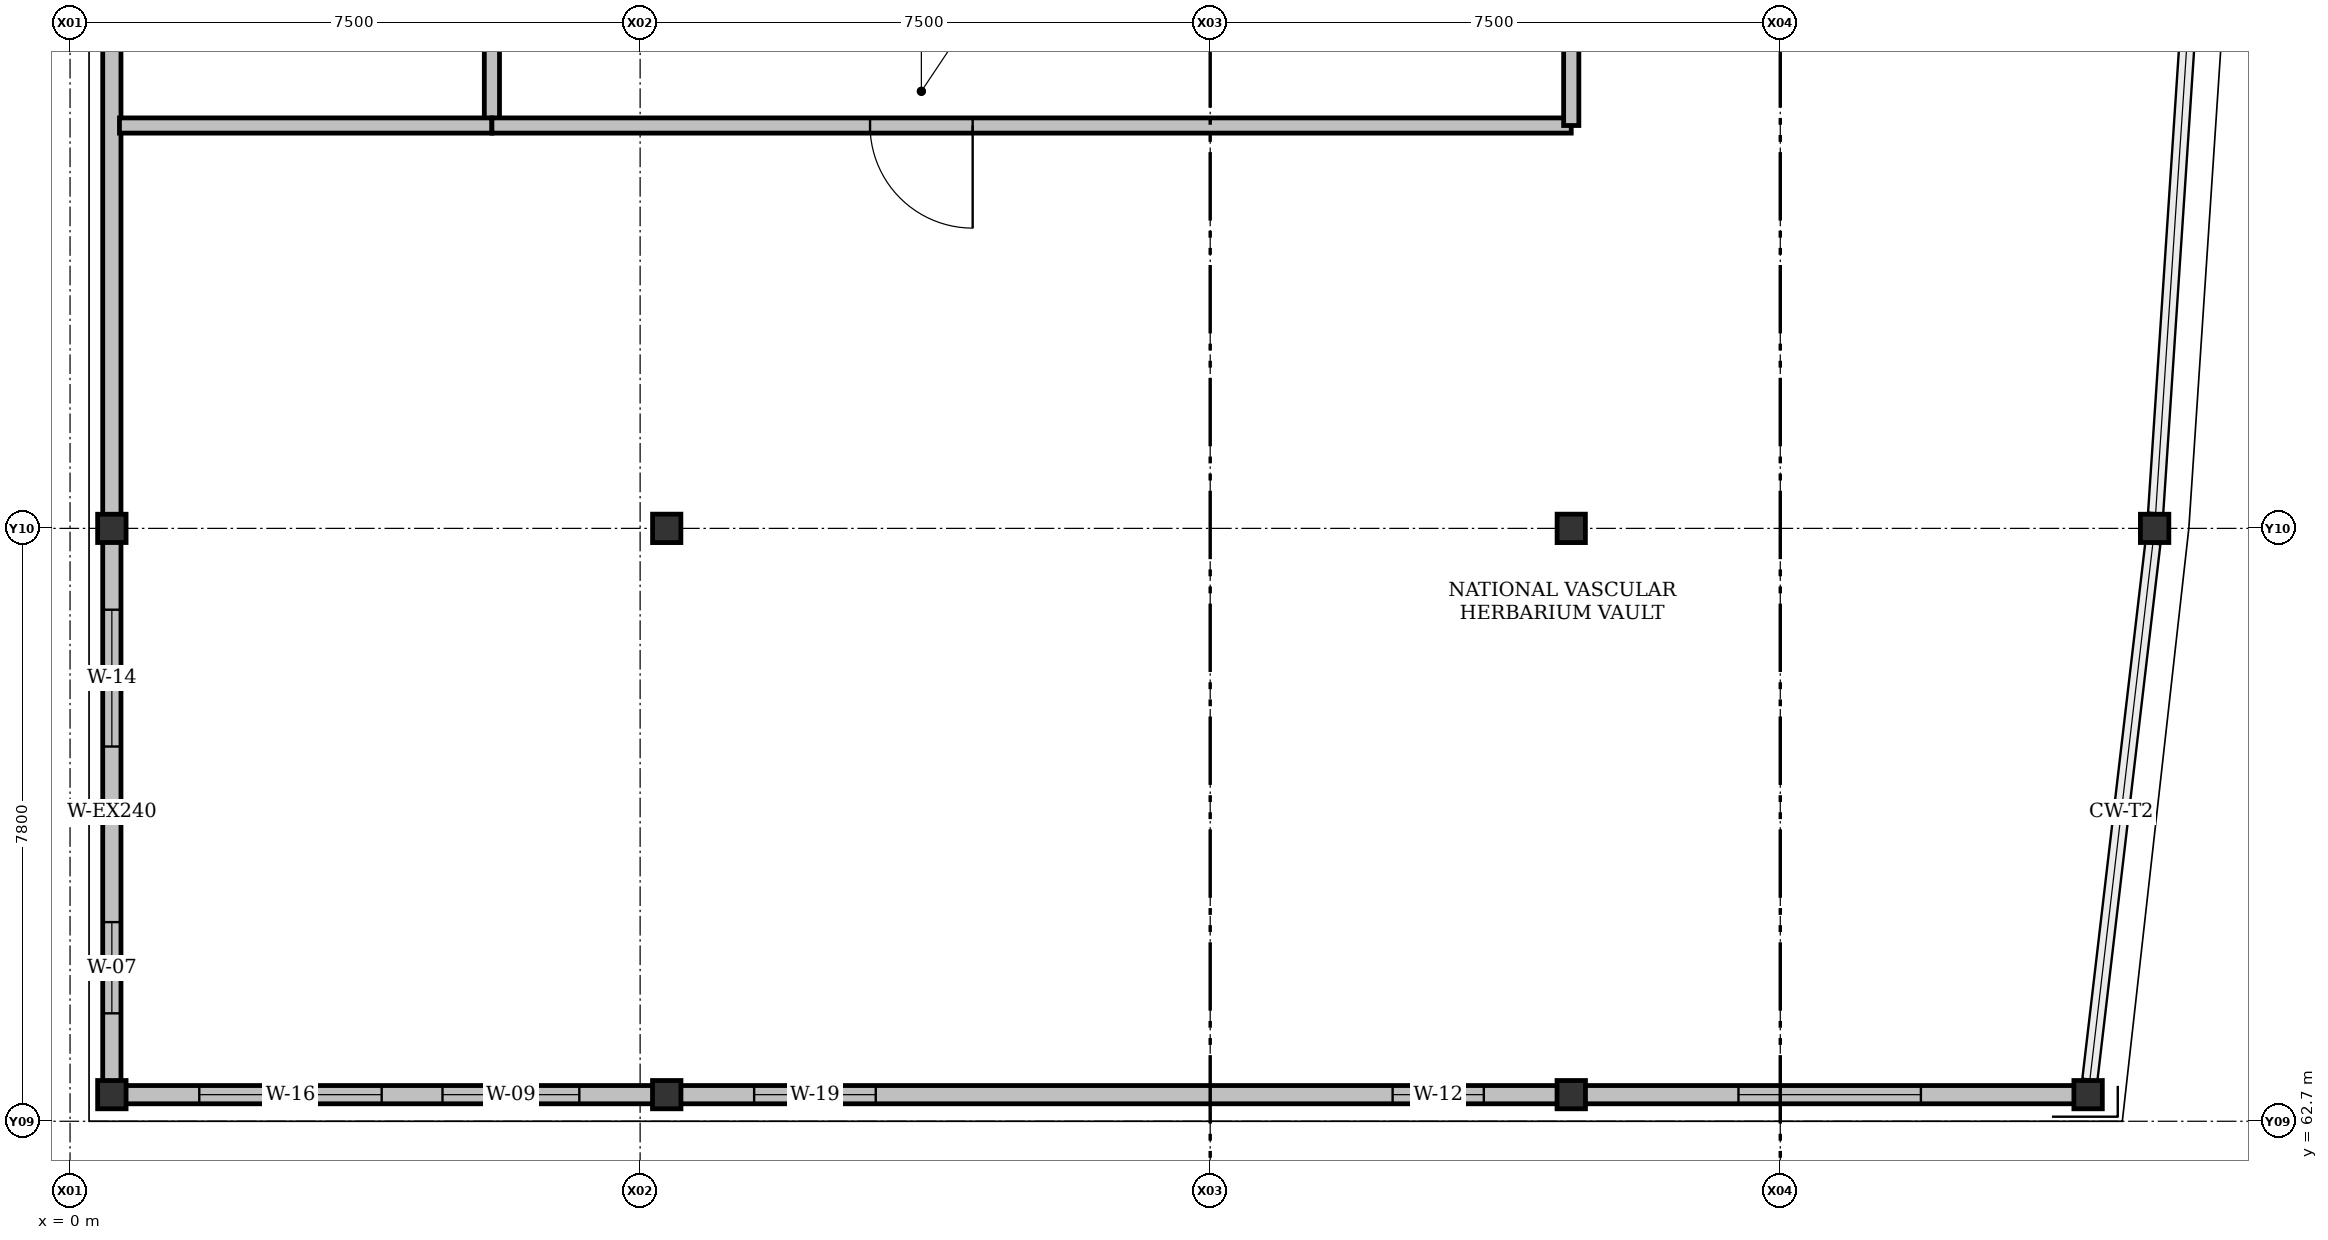
"""IFC4 building model, lengths in metres.
Left out: names, types, materials, properties, quantities, classifications, styles, units other than length and angle.
Written with IfcOpenShell. Run it as: python <this file> out.ifc"""

import sys

from ifc_helpers import new_model, si_unit, direction, frame, frame_2d, origin, origin_2d, place, context, subcontext, project, spatial, rectangle, i_section, extrude, element, fill, save


model = new_model("IFC4")
c1 = context("Model", 3, precision=1e-05, world=origin(), true_north=direction((0.0, 1.0)))
c2 = subcontext(c1, "Body", "Model", "MODEL_VIEW")
j1 = project(units=[si_unit("LENGTHUNIT", "METRE"), si_unit("PLANEANGLEUNIT", "RADIAN")], contexts=[c1])
p1 = place(None, origin())
s1 = spatial("IfcSite", under=j1, at=p1, CompositionType="ELEMENT")
p2 = place(p1, origin())
s2 = spatial("IfcBuilding", under=s1, at=p2, CompositionType="ELEMENT")
p3 = place(p2, frame((0.0, 0.0, 26.7)))
s3 = spatial("IfcBuildingStorey", under=s2, at=p3, CompositionType="ELEMENT", Elevation=26.7)
for number, where, z_axis, x_axis in (
    (1, (0.55, 63.05, 0.0), (0.0, 0.0, 1.0), (1.0, 0.0, 0.0)),
    (2, (7.85, 63.05, 0.0), (0.0, 0.0, 1.0), (1.0, 0.0, 0.0)),
    (3, (19.75, 63.05, 0.0), (0.0, 0.0, 1.0), (1.0, 0.0, 0.0)),
    (4, (26.55, 63.05, 0.0), (0.0, 0.0, 1.0), (1.0, 0.0, 0.0)),
    (5, (0.55, 70.5, 0.0), (0.0, 0.0, 1.0), (1.0, 0.0, 0.0)),
    (6, (7.85, 70.5, 0.0), (0.0, 0.0, 1.0), (0.0, 1.0, 0.0)),
    (7, (19.75, 70.5, 0.0), (0.0, 0.0, 1.0), (0.0, 1.0, 0.0)),
    (8, (27.425, 70.5, 0.0), (0.0, 0.0, 1.0), (1.0, 0.0, 0.0)),
):
    element("IfcColumn", number, at=place(p3, frame(where, z_axis=z_axis, x_axis=x_axis)), inside=s3, PredefinedType="COLUMN", context=c2, shape_type="SweptSolid", body=[
        extrude(i_section(OverallWidth=0.374, OverallDepth=0.372, WebThickness=0.016, FlangeThickness=0.026, FilletRadius=0.015, at=origin_2d()), origin(), (0.0, 0.0, 1.0), 4.2),
    ])
p4 = place(p3, frame((0.55, 63.05, 0.0), z_axis=(0.0, 0.0, 1.0), x_axis=(0.0, 1.0, 0.0)))
e9 = element("IfcWall", 9, at=p4, inside=s3, PredefinedType="SOLIDWALL", context=c2, shape_type="SweptSolid", body=[
    extrude(rectangle(XDim=7.45, YDim=0.24, at=frame_2d((3.725, 0.0))), origin(), (0.0, 0.0, 1.0), 3.557),
])
p5 = place(p4, frame((1.07, 0.0, 0.92)))
e10 = element("IfcOpeningElement", 10, at=p5, cuts=e9, PredefinedType="OPENING", context=c2, shape_type="SweptSolid", body=[
    extrude(rectangle(XDim=1.2, YDim=1.55, at=frame_2d((0.6, 0.775))), frame((0.0, 0.12, 0.0), z_axis=(0.0, -1.0, 0.0), x_axis=(1.0, 0.0, 0.0)), (0.0, 0.0, 1.0), 0.24),
])
p6 = place(p4, frame((4.58, 0.0, 0.92)))
e11 = element("IfcOpeningElement", 11, at=p6, cuts=e9, PredefinedType="OPENING", context=c2, shape_type="SweptSolid", body=[
    extrude(rectangle(XDim=1.8, YDim=1.7, at=frame_2d((0.9, 0.85))), frame((0.0, 0.12, 0.0), z_axis=(0.0, -1.0, 0.0), x_axis=(1.0, 0.0, 0.0)), (0.0, 0.0, 1.0), 0.24),
])
p7 = place(p3, frame((0.55, 70.5, 0.0), z_axis=(0.0, 0.0, 1.0), x_axis=(0.0, 1.0, 0.0)))
e12 = element("IfcWall", 12, at=p7, inside=s3, PredefinedType="SOLIDWALL", context=c2, shape_type="SweptSolid", body=[
    extrude(rectangle(XDim=7.5, YDim=0.24, at=frame_2d((3.75, 0.0))), origin(), (0.0, 0.0, 1.0), 3.557),
])
p8 = place(p3, frame((7.85, 63.05, 0.0), z_axis=(0.0, 0.0, 1.0), x_axis=(-1.0, 0.0, 0.0)))
e13 = element("IfcWall", 13, at=p8, inside=s3, PredefinedType="SOLIDWALL", context=c2, shape_type="SweptSolid", body=[
    extrude(rectangle(XDim=7.3, YDim=0.24, at=frame_2d((3.65, 0.0))), origin(), (0.0, 0.0, 1.0), 3.557),
])
p9 = place(p8, frame((1.15, 0.0, 0.92)))
e14 = element("IfcOpeningElement", 14, at=p9, cuts=e13, PredefinedType="OPENING", context=c2, shape_type="SweptSolid", body=[
    extrude(rectangle(XDim=1.8, YDim=1.55, at=frame_2d((0.9, 0.775))), frame((0.0, 0.12, 0.0), z_axis=(0.0, -1.0, 0.0), x_axis=(1.0, 0.0, 0.0)), (0.0, 0.0, 1.0), 0.24),
])
p10 = place(p8, frame((3.75, 0.0, 0.92)))
e15 = element("IfcOpeningElement", 15, at=p10, cuts=e13, PredefinedType="OPENING", context=c2, shape_type="SweptSolid", body=[
    extrude(rectangle(XDim=2.4, YDim=1.7, at=frame_2d((1.2, 0.85))), frame((0.0, 0.12, 0.0), z_axis=(0.0, -1.0, 0.0), x_axis=(1.0, 0.0, 0.0)), (0.0, 0.0, 1.0), 0.24),
])
p11 = place(p3, frame((19.75, 63.05, 0.0), z_axis=(0.0, 0.0, 1.0), x_axis=(-1.0, 0.0, 0.0)))
e16 = element("IfcWall", 16, at=p11, inside=s3, PredefinedType="SOLIDWALL", context=c2, shape_type="SweptSolid", body=[
    extrude(rectangle(XDim=11.9, YDim=0.24, at=frame_2d((5.95, 0.0))), origin(), (0.0, 0.0, 1.0), 3.557),
])
p12 = place(p11, frame((1.15, 0.0, 0.92)))
e17 = element("IfcOpeningElement", 17, at=p12, cuts=e16, PredefinedType="OPENING", context=c2, shape_type="SweptSolid", body=[
    extrude(rectangle(XDim=1.2, YDim=1.7, at=frame_2d((0.6, 0.85))), frame((0.0, 0.12, 0.0), z_axis=(0.0, -1.0, 0.0), x_axis=(1.0, 0.0, 0.0)), (0.0, 0.0, 1.0), 0.24),
])
p13 = place(p11, frame((9.15, 0.0, 0.92)))
e18 = element("IfcOpeningElement", 18, at=p13, cuts=e16, PredefinedType="OPENING", context=c2, shape_type="SweptSolid", body=[
    extrude(rectangle(XDim=1.6, YDim=1.35, at=frame_2d((0.8, 0.675))), frame((0.0, 0.12, 0.0), z_axis=(0.0, -1.0, 0.0), x_axis=(1.0, 0.0, 0.0)), (0.0, 0.0, 1.0), 0.24),
])
p14 = place(p3, frame((26.55, 63.05, 0.0), z_axis=(0.0, 0.0, 1.0), x_axis=(-1.0, 0.0, 0.0)))
e19 = element("IfcWall", 19, at=p14, inside=s3, PredefinedType="SOLIDWALL", context=c2, shape_type="SweptSolid", body=[
    extrude(rectangle(XDim=6.8, YDim=0.24, at=frame_2d((3.4, 0.0))), origin(), (0.0, 0.0, 1.0), 3.557),
])
p15 = place(p14, frame((2.2, 0.0, 0.92)))
e20 = element("IfcOpeningElement", 20, at=p15, cuts=e19, PredefinedType="OPENING", context=c2, shape_type="SweptSolid", body=[
    extrude(rectangle(XDim=2.4, YDim=1.7, at=frame_2d((1.2, 0.85))), frame((0.0, 0.12, 0.0), z_axis=(0.0, -1.0, 0.0), x_axis=(1.0, 0.0, 0.0)), (0.0, 0.0, 1.0), 0.24),
])
p16 = place(p3, frame((5.55, 75.8, 0.0), z_axis=(0.0, 0.0, 1.0), x_axis=(0.0, 1.0, 0.0)))
e21 = element("IfcWall", 21, at=p16, inside=s3, PredefinedType="SOLIDWALL", context=c2, shape_type="SweptSolid", body=[
    extrude(rectangle(XDim=9.4, YDim=0.2, at=frame_2d((4.7, 0.0))), origin(), (0.0, 0.0, 1.0), 3.277),
])
p17 = place(p16, frame((3.95, 0.0, 0.0)))
e22 = element("IfcOpeningElement", 22, at=p17, cuts=e21, PredefinedType="OPENING", context=c2, shape_type="SweptSolid", body=[
    extrude(rectangle(XDim=1.5, YDim=2.3, at=frame_2d((0.75, 1.15))), frame((0.0, 0.1, 0.0), z_axis=(0.0, -1.0, 0.0), x_axis=(1.0, 0.0, 0.0)), (0.0, 0.0, 1.0), 0.2),
])
p18 = place(p3, frame((0.65, 75.8, 0.0), z_axis=(0.0, 0.0, 1.0), x_axis=(1.0, 0.0, 0.0)))
e23 = element("IfcWall", 23, at=p18, inside=s3, PredefinedType="SOLIDWALL", context=c2, shape_type="SweptSolid", body=[
    extrude(rectangle(XDim=4.9, YDim=0.2, at=frame_2d((2.45, 0.0))), origin(), (0.0, 0.0, 1.0), 3.95),
])
p19 = place(p3, frame((19.75, 75.8, 0.0), z_axis=(0.0, 0.0, 1.0), x_axis=(-1.0, 0.0, 0.0)))
e24 = element("IfcWall", 24, at=p19, inside=s3, PredefinedType="SOLIDWALL", context=c2, shape_type="SweptSolid", body=[
    extrude(rectangle(XDim=14.2, YDim=0.2, at=frame_2d((7.1, 0.0))), origin(), (0.0, 0.0, 1.0), 3.507),
])
p20 = place(p19, frame((7.875, 0.0, 0.0)))
e25 = element("IfcOpeningElement", 25, at=p20, cuts=e24, PredefinedType="OPENING", context=c2, shape_type="SweptSolid", body=[
    extrude(rectangle(XDim=1.35, YDim=2.25, at=frame_2d((0.675, 1.125))), frame((0.0, 0.1, 0.0), z_axis=(0.0, -1.0, 0.0), x_axis=(1.0, 0.0, 0.0)), (0.0, 0.0, 1.0), 0.2),
])
p21 = place(p3, frame((19.75, 77.819, 0.0), z_axis=(0.0, 0.0, 1.0), x_axis=(0.0, -1.0, 0.0)))
e26 = element("IfcWall", 26, at=p21, inside=s3, PredefinedType="SOLIDWALL", context=c2, shape_type="SweptSolid", body=[
    extrude(rectangle(XDim=2.019, YDim=0.2, at=frame_2d((1.01, 0.0))), origin(), (0.0, 0.0, 1.0), 3.507),
])
p22 = place(p5, origin())
e27 = element("IfcWindow", 27, at=p22, inside=s3, PartitioningType="SINGLE_PANEL", PredefinedType="WINDOW", context=c2, shape_type="SweptSolid", body=[
    extrude(rectangle(XDim=1.2, YDim=1.55, at=frame_2d((0.6, 0.775))), frame((0.0, 0.03, 0.0), z_axis=(0.0, -1.0, 0.0), x_axis=(1.0, 0.0, 0.0)), (0.0, 0.0, 1.0), 0.06),
])
fill(e10, e27)
p23 = place(p6, origin())
e28 = element("IfcWindow", 28, at=p23, inside=s3, PartitioningType="DOUBLE_PANEL_VERTICAL", PredefinedType="WINDOW", context=c2, shape_type="SweptSolid", body=[
    extrude(rectangle(XDim=1.8, YDim=1.7, at=frame_2d((0.9, 0.85))), frame((0.0, 0.03, 0.0), z_axis=(0.0, -1.0, 0.0), x_axis=(1.0, 0.0, 0.0)), (0.0, 0.0, 1.0), 0.06),
])
fill(e11, e28)
p24 = place(p9, origin())
e29 = element("IfcWindow", 29, at=p24, inside=s3, PartitioningType="DOUBLE_PANEL_VERTICAL", PredefinedType="WINDOW", context=c2, shape_type="SweptSolid", body=[
    extrude(rectangle(XDim=1.8, YDim=1.55, at=frame_2d((0.9, 0.775))), frame((0.0, 0.03, 0.0), z_axis=(0.0, -1.0, 0.0), x_axis=(1.0, 0.0, 0.0)), (0.0, 0.0, 1.0), 0.06),
])
fill(e14, e29)
p25 = place(p10, origin())
e30 = element("IfcWindow", 30, at=p25, inside=s3, PartitioningType="DOUBLE_PANEL_VERTICAL", PredefinedType="WINDOW", context=c2, shape_type="SweptSolid", body=[
    extrude(rectangle(XDim=2.4, YDim=1.7, at=frame_2d((1.2, 0.85))), frame((0.0, 0.03, 0.0), z_axis=(0.0, -1.0, 0.0), x_axis=(1.0, 0.0, 0.0)), (0.0, 0.0, 1.0), 0.06),
])
fill(e15, e30)
p26 = place(p12, origin())
e31 = element("IfcWindow", 31, at=p26, inside=s3, PartitioningType="SINGLE_PANEL", PredefinedType="WINDOW", context=c2, shape_type="SweptSolid", body=[
    extrude(rectangle(XDim=1.2, YDim=1.7, at=frame_2d((0.6, 0.85))), frame((0.0, 0.03, 0.0), z_axis=(0.0, -1.0, 0.0), x_axis=(1.0, 0.0, 0.0)), (0.0, 0.0, 1.0), 0.06),
])
fill(e17, e31)
p27 = place(p13, origin())
e32 = element("IfcWindow", 32, at=p27, inside=s3, PartitioningType="DOUBLE_PANEL_VERTICAL", PredefinedType="WINDOW", context=c2, shape_type="SweptSolid", body=[
    extrude(rectangle(XDim=1.6, YDim=1.35, at=frame_2d((0.8, 0.675))), frame((0.0, 0.03, 0.0), z_axis=(0.0, -1.0, 0.0), x_axis=(1.0, 0.0, 0.0)), (0.0, 0.0, 1.0), 0.06),
])
fill(e18, e32)
p28 = place(p15, origin())
e33 = element("IfcWindow", 33, at=p28, inside=s3, PartitioningType="DOUBLE_PANEL_VERTICAL", PredefinedType="WINDOW", context=c2, shape_type="SweptSolid", body=[
    extrude(rectangle(XDim=2.4, YDim=1.7, at=frame_2d((1.2, 0.85))), frame((0.0, 0.03, 0.0), z_axis=(0.0, -1.0, 0.0), x_axis=(1.0, 0.0, 0.0)), (0.0, 0.0, 1.0), 0.06),
])
fill(e20, e33)
p29 = place(p20, origin())
e34 = element("IfcDoor", 34, at=p29, inside=s3, OperationType="SINGLE_SWING_LEFT", PredefinedType="DOOR", context=c2, shape_type="SweptSolid", body=[
    extrude(rectangle(XDim=1.35, YDim=2.25, at=frame_2d((0.675, 1.125))), frame((0.0, 0.025, 0.0), z_axis=(0.0, -1.0, 0.0), x_axis=(1.0, 0.0, 0.0)), (0.0, 0.0, 1.0), 0.05),
])
fill(e25, e34)
save(model, sys.argv[1])
